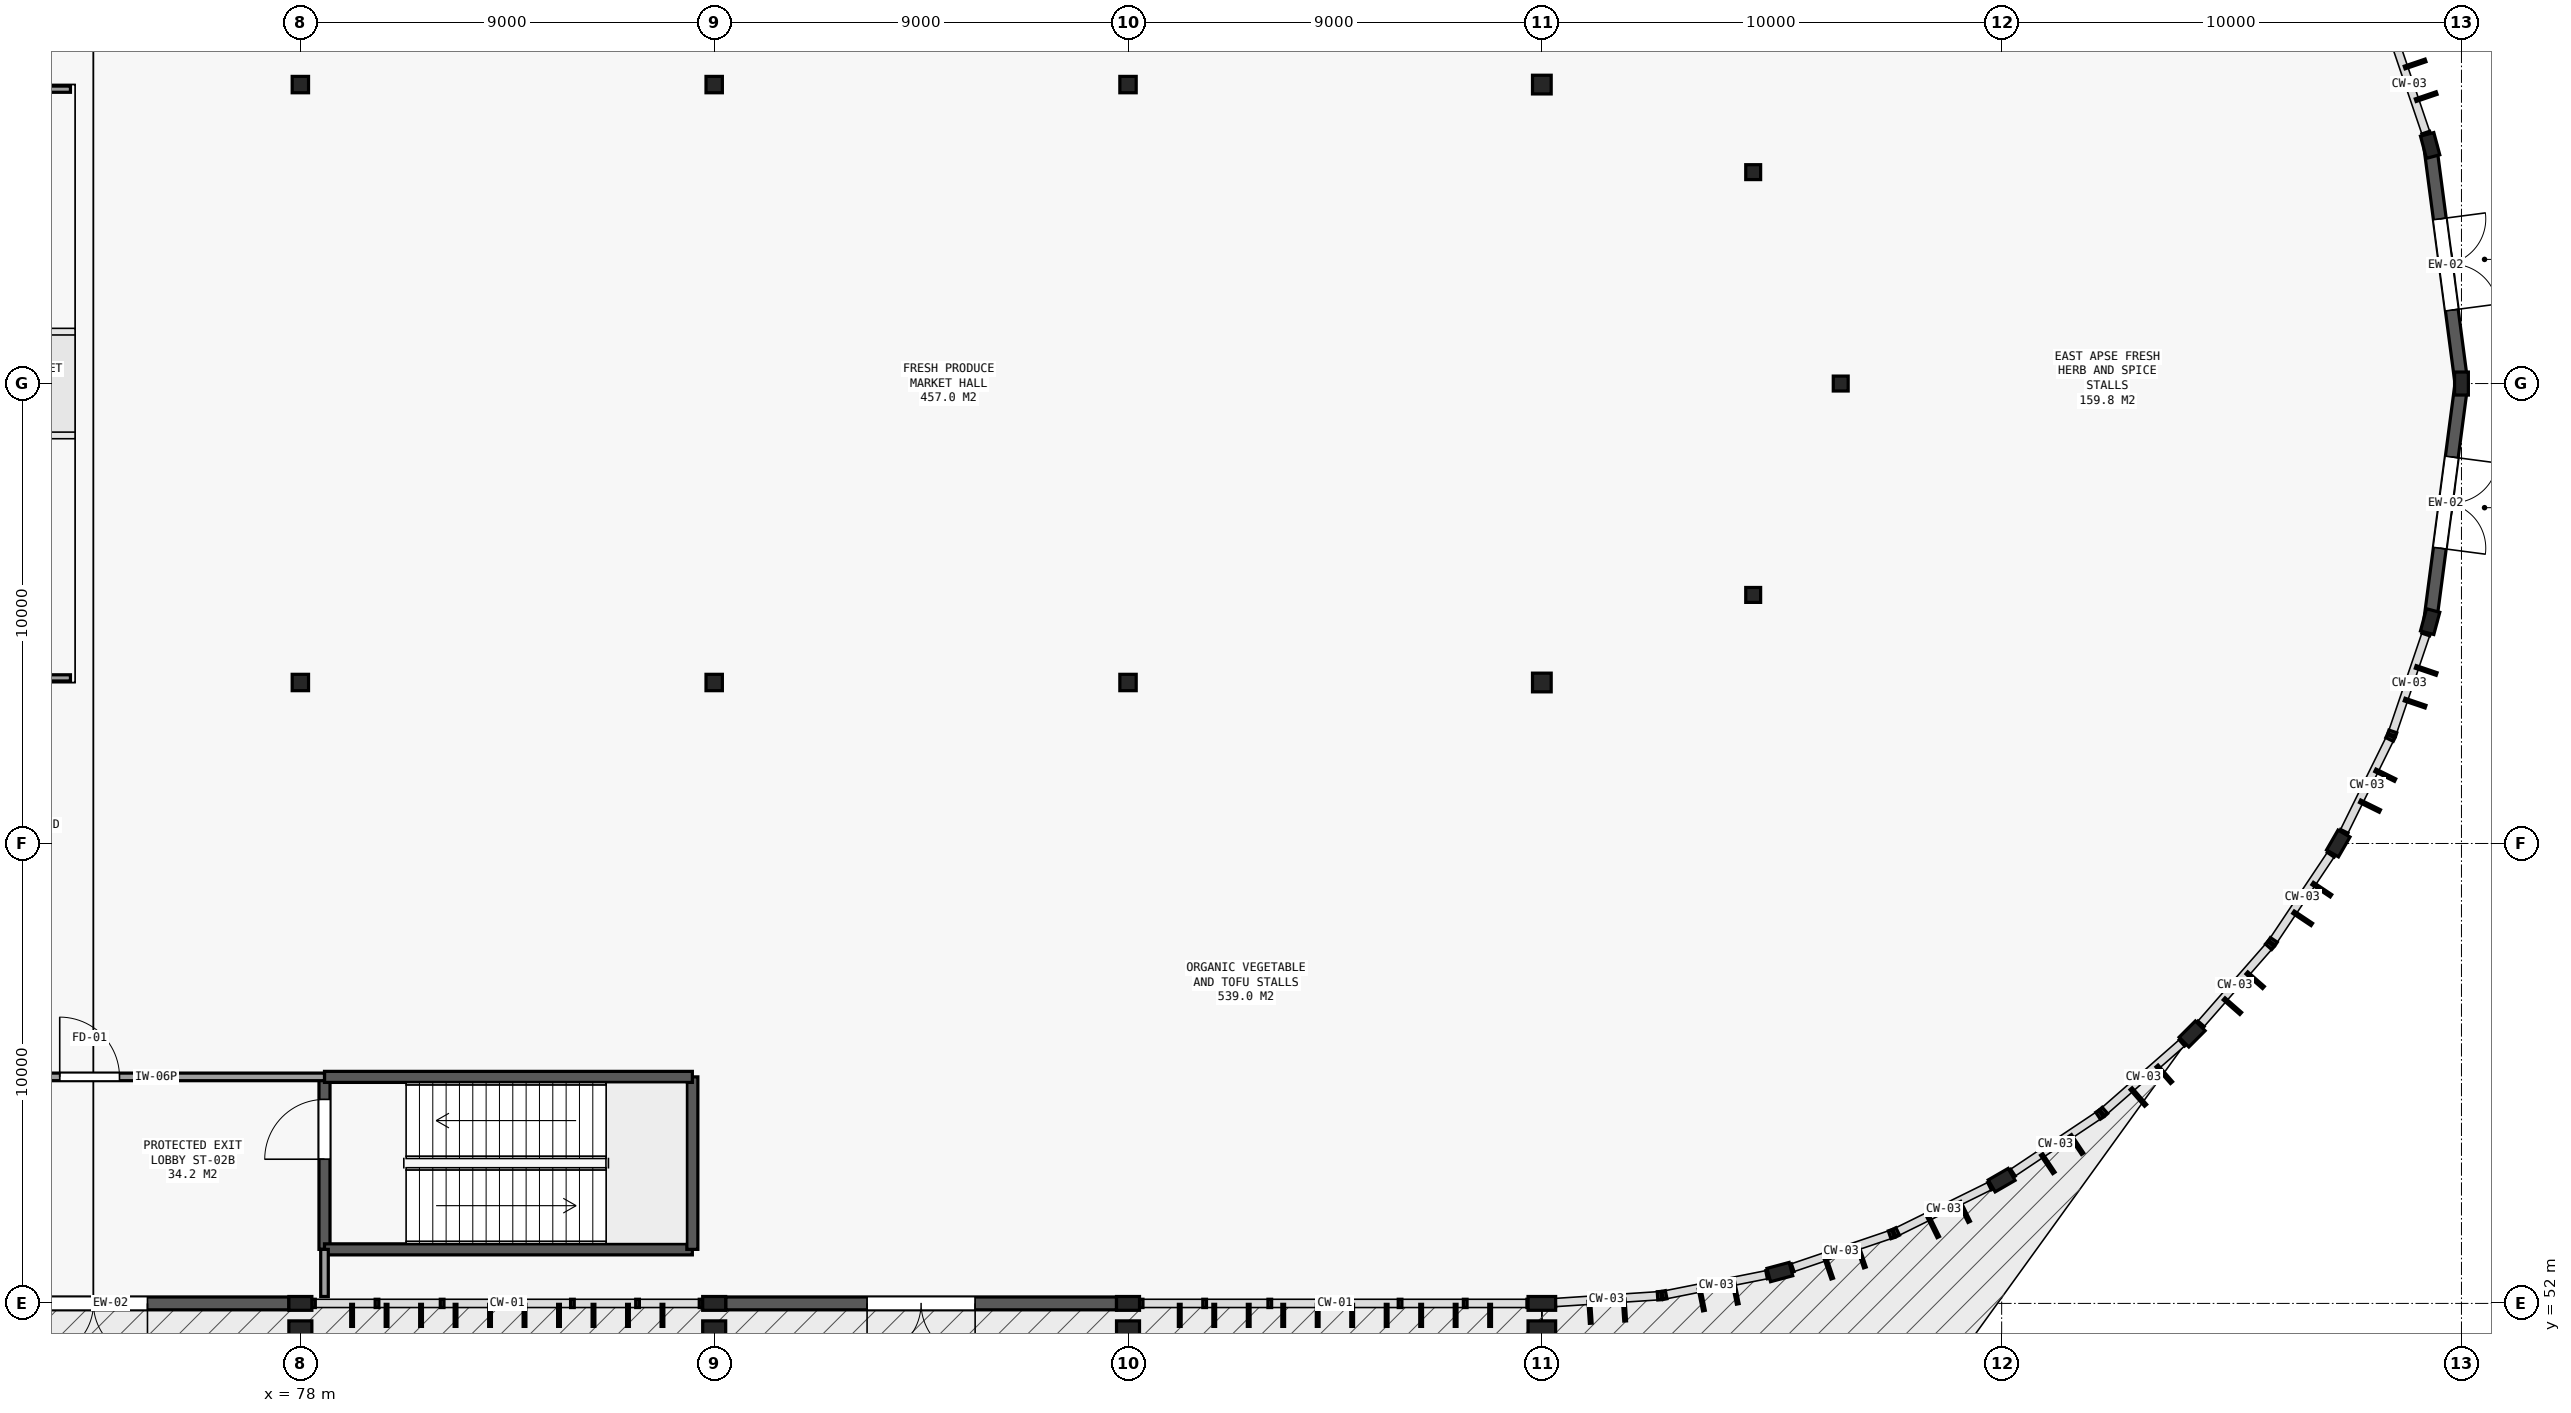
"""IFC4 building model, lengths in metres.
Left out: names, types, materials, properties, quantities, classifications, styles, units other than length and angle.
Written with IfcOpenShell. Run it as: python <this file> out.ifc"""

import sys

from ifc_helpers import new_model, si_unit, direction, frame, frame_2d, origin, origin_2d, place, context, subcontext, project, spatial, rectangle, hollow_circle, i_section, extrude, element, fill, save


model = new_model("IFC4")
c1 = context("Model", 3, precision=1e-05, world=origin(), true_north=direction((0.0, 1.0)))
c2 = subcontext(c1, "Body", "Model", "MODEL_VIEW")
j1 = project(units=[si_unit("LENGTHUNIT", "METRE"), si_unit("PLANEANGLEUNIT", "RADIAN")], contexts=[c1])
p1 = place(None, origin())
s1 = spatial("IfcSite", under=j1, at=p1, CompositionType="ELEMENT")
p2 = place(p1, origin())
s2 = spatial("IfcBuilding", under=s1, at=p2, CompositionType="ELEMENT")
p3 = place(p2, origin())
s3 = spatial("IfcBuildingStorey", under=s2, at=p3, CompositionType="ELEMENT", Elevation=0.0)
p4 = place(p3, frame((78.0, 51.17, 0.0), z_axis=(0.0, 0.0, 1.0), x_axis=(1.0, 0.0, 0.0)))
e1 = element("IfcColumn", 1, at=p4, inside=s3, PredefinedType="PILASTER", context=c2, shape_type="SweptSolid", body=[
    extrude(rectangle(XDim=0.5, YDim=0.9, at=origin_2d()), origin(), (0.0, 0.0, 1.0), 5.4),
])
p5 = place(p3, frame((78.0, 52.0, 0.0), z_axis=(0.0, 0.0, 1.0), x_axis=(0.0, 1.0, 0.0)))
e2 = element("IfcColumn", 2, at=p5, inside=s3, PredefinedType="COLUMN", context=c2, shape_type="SweptSolid", body=[
    extrude(i_section(OverallWidth=0.3, OverallDepth=0.5, WebThickness=0.014, FlangeThickness=0.028, FilletRadius=0.027, at=origin_2d()), origin(), (0.0, 0.0, 1.0), 5.4),
])
p6 = place(p3, frame((87.0, 51.17, 0.0), z_axis=(0.0, 0.0, 1.0), x_axis=(1.0, 0.0, 0.0)))
e3 = element("IfcColumn", 3, at=p6, inside=s3, PredefinedType="PILASTER", context=c2, shape_type="SweptSolid", body=[
    extrude(rectangle(XDim=0.5, YDim=0.9, at=origin_2d()), origin(), (0.0, 0.0, 1.0), 5.4),
])
p7 = place(p3, frame((87.0, 52.0, 0.0), z_axis=(0.0, 0.0, 1.0), x_axis=(0.0, 1.0, 0.0)))
e4 = element("IfcColumn", 4, at=p7, inside=s3, PredefinedType="COLUMN", context=c2, shape_type="SweptSolid", body=[
    extrude(i_section(OverallWidth=0.3, OverallDepth=0.5, WebThickness=0.014, FlangeThickness=0.028, FilletRadius=0.027, at=origin_2d()), origin(), (0.0, 0.0, 1.0), 5.4),
])
p8 = place(p3, frame((96.0, 51.17, 0.0), z_axis=(0.0, 0.0, 1.0), x_axis=(1.0, 0.0, 0.0)))
e5 = element("IfcColumn", 5, at=p8, inside=s3, PredefinedType="PILASTER", context=c2, shape_type="SweptSolid", body=[
    extrude(rectangle(XDim=0.5, YDim=0.9, at=origin_2d()), origin(), (0.0, 0.0, 1.0), 5.4),
])
p9 = place(p3, frame((96.0, 52.0, 0.0), z_axis=(0.0, 0.0, 1.0), x_axis=(0.0, 1.0, 0.0)))
e6 = element("IfcColumn", 6, at=p9, inside=s3, PredefinedType="COLUMN", context=c2, shape_type="SweptSolid", body=[
    extrude(i_section(OverallWidth=0.3, OverallDepth=0.5, WebThickness=0.014, FlangeThickness=0.028, FilletRadius=0.027, at=origin_2d()), origin(), (0.0, 0.0, 1.0), 5.4),
])
p10 = place(p3, frame((105.0, 51.12, 0.0), z_axis=(0.0, 0.0, 1.0), x_axis=(1.0, 0.0, 0.0)))
e7 = element("IfcColumn", 7, at=p10, inside=s3, PredefinedType="PILASTER", context=c2, shape_type="SweptSolid", body=[
    extrude(rectangle(XDim=0.6, YDim=1.0, at=origin_2d()), origin(), (0.0, 0.0, 1.0), 5.4),
])
p11 = place(p3, frame((105.0, 52.0, 0.0), z_axis=(0.0, 0.0, 1.0), x_axis=(0.0, 1.0, 0.0)))
e8 = element("IfcColumn", 8, at=p11, inside=s3, PredefinedType="COLUMN", context=c2, shape_type="SweptSolid", body=[
    extrude(i_section(OverallWidth=0.3, OverallDepth=0.6, WebThickness=0.015, FlangeThickness=0.03, FilletRadius=0.027, at=origin_2d()), origin(), (0.0, 0.0, 1.0), 5.4),
])
for number, where, z_axis, x_axis in (
    (9, (110.176, 52.681, 0.0), (0.0, 0.0, 1.0), (0.259, -0.966, 0.0)),
    (10, (115.0, 54.679, 0.0), (0.0, 0.0, 1.0), (0.5, -0.866, 0.0)),
    (11, (119.142, 57.858, 0.0), (0.0, 0.0, 1.0), (0.707, -0.707, 0.0)),
    (12, (122.321, 62.0, 0.0), (0.0, 0.0, 1.0), (0.866, -0.5, 0.0)),
    (13, (124.319, 66.824, 0.0), (0.0, 0.0, 1.0), (0.966, -0.259, 0.0)),
    (14, (125.0, 72.0, 0.0), (0.0, 0.0, 1.0), (1.0, 0.0, 0.0)),
    (15, (124.319, 77.176, 0.0), (0.0, 0.0, 1.0), (0.966, 0.259, 0.0)),
):
    element("IfcColumn", number, at=place(p3, frame(where, z_axis=z_axis, x_axis=x_axis)), inside=s3, PredefinedType="COLUMN", context=c2, shape_type="SweptSolid", body=[
        extrude(i_section(OverallWidth=0.3, OverallDepth=0.5, WebThickness=0.014, FlangeThickness=0.028, FilletRadius=0.027, at=origin_2d()), origin(), (0.0, 0.0, 1.0), 5.4),
    ])
for number, where, z_axis, x_axis in (
    (16, (78.0, 65.5, 0.0), (0.0, 0.0, 1.0), (1.0, 0.0, 0.0)),
    (17, (78.0, 78.5, 0.0), (0.0, 0.0, 1.0), (1.0, 0.0, 0.0)),
    (18, (87.0, 65.5, 0.0), (0.0, 0.0, 1.0), (1.0, 0.0, 0.0)),
    (19, (87.0, 78.5, 0.0), (0.0, 0.0, 1.0), (1.0, 0.0, 0.0)),
    (20, (96.0, 65.5, 0.0), (0.0, 0.0, 1.0), (1.0, 0.0, 0.0)),
    (21, (96.0, 78.5, 0.0), (0.0, 0.0, 1.0), (1.0, 0.0, 0.0)),
):
    element("IfcColumn", number, at=place(p3, frame(where, z_axis=z_axis, x_axis=x_axis)), inside=s3, PredefinedType="COLUMN", context=c2, shape_type="SweptSolid", body=[
        extrude(hollow_circle(Radius=0.178, WallThickness=0.012, at=origin_2d()), origin(), (0.0, 0.0, 1.0), 5.4),
    ])
for number, where, z_axis, x_axis in (
    (22, (105.0, 65.5, 0.0), (0.0, 0.0, 1.0), (1.0, 0.0, 0.0)),
    (23, (105.0, 78.5, 0.0), (0.0, 0.0, 1.0), (1.0, 0.0, 0.0)),
):
    element("IfcColumn", number, at=place(p3, frame(where, z_axis=z_axis, x_axis=x_axis)), inside=s3, PredefinedType="COLUMN", context=c2, shape_type="SweptSolid", body=[
        extrude(hollow_circle(Radius=0.203, WallThickness=0.014, at=origin_2d()), origin(), (0.0, 0.0, 1.0), 5.4),
    ])
for number, where, z_axis, x_axis in (
    (24, (109.596, 67.404, 0.0), (0.0, 0.0, 1.0), (1.0, 0.0, 0.0)),
    (25, (111.5, 72.0, 0.0), (0.0, 0.0, 1.0), (1.0, 0.0, 0.0)),
    (26, (109.596, 76.596, 0.0), (0.0, 0.0, 1.0), (1.0, 0.0, 0.0)),
):
    element("IfcColumn", number, at=place(p3, frame(where, z_axis=z_axis, x_axis=x_axis)), inside=s3, PredefinedType="COLUMN", context=c2, shape_type="SweptSolid", body=[
        extrude(hollow_circle(Radius=0.162, WallThickness=0.01, at=origin_2d()), origin(), (0.0, 0.0, 1.0), 5.4),
    ])
p12 = place(p3, frame((77.75, 52.0, 0.0), z_axis=(0.0, 0.0, 1.0), x_axis=(-1.0, 0.0, 0.0)))
e27 = element("IfcWall", 27, at=p12, inside=s3, PredefinedType="SOLIDWALL", context=c2, shape_type="SweptSolid", body=[
    extrude(rectangle(XDim=8.5, YDim=0.28, at=frame_2d((4.25, 0.0))), origin(), (0.0, 0.0, 1.0), 5.1),
])
p13 = place(p12, frame((3.075, 0.0, 0.0)))
e28 = element("IfcOpeningElement", 28, at=p13, cuts=e27, PredefinedType="OPENING", context=c2, shape_type="SweptSolid", body=[
    extrude(rectangle(XDim=2.35, YDim=2.45, at=frame_2d((1.175, 1.225))), frame((0.0, 0.15, 0.0), z_axis=(0.0, -1.0, 0.0), x_axis=(1.0, 0.0, 0.0)), (0.0, 0.0, 1.0), 0.3),
])
p14 = place(p3, frame((95.75, 52.0, 0.0), z_axis=(0.0, 0.0, 1.0), x_axis=(-1.0, 0.0, 0.0)))
e29 = element("IfcWall", 29, at=p14, inside=s3, PredefinedType="SOLIDWALL", context=c2, shape_type="SweptSolid", body=[
    extrude(rectangle(XDim=8.5, YDim=0.28, at=frame_2d((4.25, 0.0))), origin(), (0.0, 0.0, 1.0), 5.1),
])
p15 = place(p14, frame((3.075, 0.0, 0.0)))
e30 = element("IfcOpeningElement", 30, at=p15, cuts=e29, PredefinedType="OPENING", context=c2, shape_type="SweptSolid", body=[
    extrude(rectangle(XDim=2.35, YDim=2.45, at=frame_2d((1.175, 1.225))), frame((0.0, 0.15, 0.0), z_axis=(0.0, -1.0, 0.0), x_axis=(1.0, 0.0, 0.0)), (0.0, 0.0, 1.0), 0.3),
])
p16 = place(p3, frame((125.0, 72.0, 0.0), z_axis=(0.0, 0.0, 1.0), x_axis=(-0.130512574825, -0.991446654043, 0.0)))
e31 = element("IfcWall", 31, at=p16, inside=s3, PredefinedType="SOLIDWALL", context=c2, shape_type="SweptSolid", body=[
    extrude(rectangle(XDim=5.221, YDim=0.28, at=frame_2d((2.61, 0.0))), origin(), (0.0, 0.0, 1.0), 5.1),
])
p17 = place(p16, frame((1.611, 0.0, 0.0)))
e32 = element("IfcOpeningElement", 32, at=p17, cuts=e31, PredefinedType="OPENING", context=c2, shape_type="SweptSolid", body=[
    extrude(rectangle(XDim=2.0, YDim=2.3, at=frame_2d((1.0, 1.15))), frame((0.0, 0.15, 0.0), z_axis=(0.0, -1.0, 0.0), x_axis=(1.0, 0.0, 0.0)), (0.0, 0.0, 1.0), 0.3),
])
p18 = place(p3, frame((124.319, 77.176, 0.0), z_axis=(0.0, 0.0, 1.0), x_axis=(0.130512574825, -0.991446654043, 0.0)))
e33 = element("IfcWall", 33, at=p18, inside=s3, PredefinedType="SOLIDWALL", context=c2, shape_type="SweptSolid", body=[
    extrude(rectangle(XDim=5.221, YDim=0.28, at=frame_2d((2.61, 0.0))), origin(), (0.0, 0.0, 1.0), 5.1),
])
p19 = place(p18, frame((1.611, 0.0, 0.0)))
e34 = element("IfcOpeningElement", 34, at=p19, cuts=e33, PredefinedType="OPENING", context=c2, shape_type="SweptSolid", body=[
    extrude(rectangle(XDim=2.0, YDim=2.3, at=frame_2d((1.0, 1.15))), frame((0.0, 0.15, 0.0), z_axis=(0.0, -1.0, 0.0), x_axis=(1.0, 0.0, 0.0)), (0.0, 0.0, 1.0), 0.3),
])
p20 = place(p3, frame((78.525, 53.175, 0.0), z_axis=(0.0, 0.0, 1.0), x_axis=(0.0, 1.0, 0.0)))
e35 = element("IfcWall", 35, at=p20, inside=s3, PredefinedType="SOLIDWALL", context=c2, shape_type="SweptSolid", body=[
    extrude(rectangle(XDim=3.75, YDim=0.24, at=frame_2d((1.875, 0.0))), origin(), (0.0, 0.0, 1.0), 5.16),
])
p21 = place(p20, frame((1.96, 0.0, 0.0)))
e36 = element("IfcOpeningElement", 36, at=p21, cuts=e35, PredefinedType="OPENING", context=c2, shape_type="SweptSolid", body=[
    extrude(rectangle(XDim=1.3, YDim=2.15, at=frame_2d((0.65, 1.075))), frame((0.0, 0.13, 0.0), z_axis=(0.0, -1.0, 0.0), x_axis=(1.0, 0.0, 0.0)), (0.0, 0.0, 1.0), 0.26),
])
p22 = place(p3, frame((86.525, 53.175, 0.0), z_axis=(0.0, 0.0, 1.0), x_axis=(-1.0, 0.0, 0.0)))
e37 = element("IfcWall", 37, at=p22, inside=s3, PredefinedType="SOLIDWALL", context=c2, shape_type="SweptSolid", body=[
    extrude(rectangle(XDim=8.0, YDim=0.24, at=frame_2d((4.0, 0.0))), origin(), (0.0, 0.0, 1.0), 5.16),
])
p23 = place(p3, frame((86.525, 56.925, 0.0), z_axis=(0.0, 0.0, 1.0), x_axis=(0.0, -1.0, 0.0)))
e38 = element("IfcWall", 38, at=p23, inside=s3, PredefinedType="SOLIDWALL", context=c2, shape_type="SweptSolid", body=[
    extrude(rectangle(XDim=3.75, YDim=0.24, at=frame_2d((1.875, 0.0))), origin(), (0.0, 0.0, 1.0), 5.16),
])
p24 = place(p3, frame((78.525, 56.925, 0.0), z_axis=(0.0, 0.0, 1.0), x_axis=(1.0, 0.0, 0.0)))
e39 = element("IfcWall", 39, at=p24, inside=s3, PredefinedType="SOLIDWALL", context=c2, shape_type="SweptSolid", body=[
    extrude(rectangle(XDim=8.0, YDim=0.24, at=frame_2d((4.0, 0.0))), origin(), (0.0, 0.0, 1.0), 5.16),
])
p25 = place(p3, frame((71.2, 56.925, 0.0), z_axis=(0.0, 0.0, 1.0), x_axis=(1.0, 0.0, 0.0)))
e40 = element("IfcWall", 40, at=p25, inside=s3, PredefinedType="PARTITIONING", context=c2, shape_type="SweptSolid", body=[
    extrude(rectangle(XDim=7.325, YDim=0.165, at=frame_2d((3.663, 0.0))), origin(), (0.0, 0.0, 1.0), 4.71),
])
p26 = place(p25, frame((1.566, 0.0, 0.0)))
e41 = element("IfcOpeningElement", 41, at=p26, cuts=e40, PredefinedType="OPENING", context=c2, shape_type="SweptSolid", body=[
    extrude(rectangle(XDim=1.3, YDim=2.15, at=frame_2d((0.65, 1.075))), frame((0.0, 0.093, 0.0), z_axis=(0.0, -1.0, 0.0), x_axis=(1.0, 0.0, 0.0)), (0.0, 0.0, 1.0), 0.185),
])
p27 = place(p3, frame((78.525, 52.15, 0.0), z_axis=(0.0, 0.0, 1.0), x_axis=(0.0, 1.0, 0.0)))
e42 = element("IfcWall", 42, at=p27, inside=s3, PredefinedType="PARTITIONING", context=c2, shape_type="SweptSolid", body=[
    extrude(rectangle(XDim=1.025, YDim=0.165, at=frame_2d((0.513, 0.0))), origin(), (0.0, 0.0, 1.0), 5.08),
])
for number, where, z_axis, x_axis in (
    (43, (42.3, 78.4, -0.15), (0.0, 0.0, 1.0), (1.0, 0.0, 0.0)),
    (44, (73.0, 65.6, -0.15), (0.0, 0.0, 1.0), (-1.0, 0.0, 0.0)),
):
    element("IfcWall", number, at=place(p3, frame(where, z_axis=z_axis, x_axis=x_axis)), inside=s3, PredefinedType="PARTITIONING", context=c2, shape_type="SweptSolid", body=[
        extrude(rectangle(XDim=30.7, YDim=0.135, at=frame_2d((15.35, 0.0))), origin(), (0.0, 0.0, 1.0), 1.0),
    ])
p28 = place(p13, origin())
e45 = element("IfcDoor", 45, at=p28, inside=s3, OperationType="DOUBLE_DOOR_SINGLE_SWING", PredefinedType="DOOR", context=c2, shape_type="SweptSolid", body=[
    extrude(rectangle(XDim=2.35, YDim=2.45, at=frame_2d((1.175, 1.225))), frame((0.0, 0.025, 0.0), z_axis=(0.0, -1.0, 0.0), x_axis=(1.0, 0.0, 0.0)), (0.0, 0.0, 1.0), 0.05),
])
fill(e28, e45)
p29 = place(p15, origin())
e46 = element("IfcDoor", 46, at=p29, inside=s3, OperationType="DOUBLE_DOOR_SINGLE_SWING", PredefinedType="DOOR", context=c2, shape_type="SweptSolid", body=[
    extrude(rectangle(XDim=2.35, YDim=2.45, at=frame_2d((1.175, 1.225))), frame((0.0, 0.025, 0.0), z_axis=(0.0, -1.0, 0.0), x_axis=(1.0, 0.0, 0.0)), (0.0, 0.0, 1.0), 0.05),
])
fill(e30, e46)
p30 = place(p17, origin())
e47 = element("IfcDoor", 47, at=p30, inside=s3, OperationType="DOUBLE_DOOR_SINGLE_SWING", PredefinedType="DOOR", context=c2, shape_type="SweptSolid", body=[
    extrude(rectangle(XDim=2.0, YDim=2.3, at=frame_2d((1.0, 1.15))), frame((0.0, 0.025, 0.0), z_axis=(0.0, -1.0, 0.0), x_axis=(1.0, 0.0, 0.0)), (0.0, 0.0, 1.0), 0.05),
])
fill(e32, e47)
p31 = place(p19, origin())
e48 = element("IfcDoor", 48, at=p31, inside=s3, OperationType="DOUBLE_DOOR_SINGLE_SWING", PredefinedType="DOOR", context=c2, shape_type="SweptSolid", body=[
    extrude(rectangle(XDim=2.0, YDim=2.3, at=frame_2d((1.0, 1.15))), frame((0.0, 0.025, 0.0), z_axis=(0.0, -1.0, 0.0), x_axis=(1.0, 0.0, 0.0)), (0.0, 0.0, 1.0), 0.05),
])
fill(e34, e48)
p32 = place(p21, origin())
e49 = element("IfcDoor", 49, at=p32, inside=s3, OperationType="SINGLE_SWING_LEFT", PredefinedType="DOOR", context=c2, shape_type="SweptSolid", body=[
    extrude(rectangle(XDim=1.3, YDim=2.15, at=frame_2d((0.65, 1.075))), frame((0.0, 0.025, 0.0), z_axis=(0.0, -1.0, 0.0), x_axis=(1.0, 0.0, 0.0)), (0.0, 0.0, 1.0), 0.05),
])
fill(e36, e49)
p33 = place(p26, origin())
e50 = element("IfcDoor", 50, at=p33, inside=s3, OperationType="SINGLE_SWING_LEFT", PredefinedType="DOOR", context=c2, shape_type="SweptSolid", body=[
    extrude(rectangle(XDim=1.3, YDim=2.15, at=frame_2d((0.65, 1.075))), frame((0.0, 0.025, 0.0), z_axis=(0.0, -1.0, 0.0), x_axis=(1.0, 0.0, 0.0)), (0.0, 0.0, 1.0), 0.05),
])
fill(e41, e50)
save(model, sys.argv[1])
